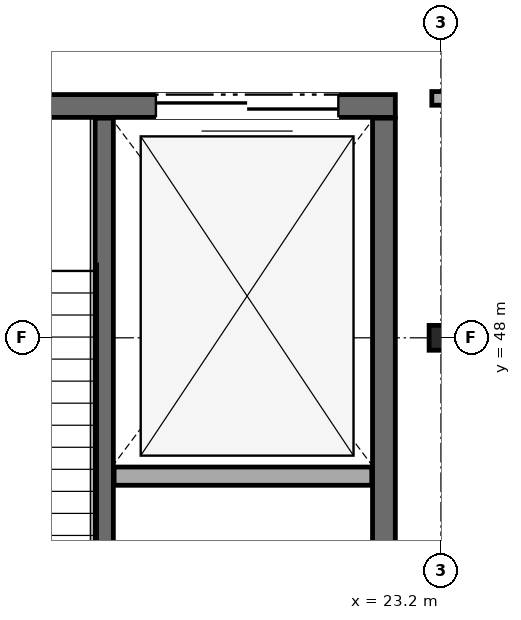
"""IFC4 building model, lengths in metres.
Left out: names, types, materials, properties, quantities, classifications, styles, units other than length and angle.
Written with IfcOpenShell. Run it as: python <this file> out.ifc"""

import sys

from ifc_helpers import new_model, si_unit, direction, frame, frame_2d, origin, origin_2d, place, context, subcontext, project, spatial, rectangle, i_section, extrude, element, fill, save


model = new_model("IFC4")
c1 = context("Model", 3, precision=1e-05, world=origin(), true_north=direction((0.0, 1.0)))
c2 = subcontext(c1, "Body", "Model", "MODEL_VIEW")
j1 = project(units=[si_unit("LENGTHUNIT", "METRE"), si_unit("PLANEANGLEUNIT", "RADIAN")], contexts=[c1])
p1 = place(None, origin())
s1 = spatial("IfcSite", under=j1, at=p1, CompositionType="ELEMENT")
p2 = place(p1, origin())
s2 = spatial("IfcBuilding", under=s1, at=p2, CompositionType="ELEMENT")
p3 = place(p2, frame((0.0, 0.0, 5.6)))
s3 = spatial("IfcBuildingStorey", under=s2, at=p3, CompositionType="ELEMENT", Elevation=5.6)
p4 = place(p3, frame((23.2, 48.0, 0.0), z_axis=(0.0, 0.0, 1.0), x_axis=(1.0, 0.0, 0.0)))
e1 = element("IfcColumn", 1, at=p4, inside=s3, PredefinedType="COLUMN", context=c2, shape_type="SweptSolid", body=[
    extrude(i_section(OverallWidth=0.311, OverallDepth=0.327, WebThickness=0.016, FlangeThickness=0.025, FilletRadius=0.017, at=origin_2d()), origin(), (0.0, 0.0, 1.0), 4.5),
])
p5 = place(p3, frame((22.6, 51.05, 0.0), z_axis=(0.0, 0.0, 1.0), x_axis=(-1.0, 0.0, 0.0)))
e2 = element("IfcWall", 2, at=p5, inside=s3, PredefinedType="SHEAR", context=c2, shape_type="SweptSolid", body=[
    extrude(rectangle(XDim=8.4, YDim=0.3, at=frame_2d((4.2, 0.0))), origin(), (0.0, 0.0, 1.0), 4.215),
])
p6 = place(p5, frame((5.435, 0.0, 0.0)))
e3 = element("IfcOpeningElement", 3, at=p6, cuts=e2, PredefinedType="OPENING", context=c2, shape_type="SweptSolid", body=[
    extrude(rectangle(XDim=1.25, YDim=2.2, at=frame_2d((0.625, 1.1))), frame((0.0, 0.16, 0.0), z_axis=(0.0, -1.0, 0.0), x_axis=(1.0, 0.0, 0.0)), (0.0, 0.0, 1.0), 0.32),
])
p7 = place(p5, frame((0.75, 0.0, 0.0)))
e4 = element("IfcOpeningElement", 4, at=p7, cuts=e2, PredefinedType="OPENING", context=c2, shape_type="SweptSolid", body=[
    extrude(rectangle(XDim=2.4, YDim=2.55, at=frame_2d((1.2, 1.275))), frame((0.0, 0.16, 0.0), z_axis=(0.0, -1.0, 0.0), x_axis=(1.0, 0.0, 0.0)), (0.0, 0.0, 1.0), 0.32),
])
p8 = place(p3, frame((22.45, 41.51, 0.0), z_axis=(0.0, 0.0, 1.0), x_axis=(0.0, 1.0, 0.0)))
e5 = element("IfcWall", 5, at=p8, inside=s3, PredefinedType="SHEAR", context=c2, shape_type="SweptSolid", body=[
    extrude(rectangle(XDim=9.38, YDim=0.3, at=frame_2d((4.69, 0.0))), origin(), (0.0, 0.0, 1.0), 4.215),
])
p9 = place(p3, frame((18.77, 41.51, 0.0), z_axis=(0.0, 0.0, 1.0), x_axis=(0.0, 1.0, 0.0)))
e6 = element("IfcWall", 6, at=p9, inside=s3, PredefinedType="SOLIDWALL", context=c2, shape_type="SweptSolid", body=[
    extrude(rectangle(XDim=9.38, YDim=0.24, at=frame_2d((4.69, 0.0))), origin(), (0.0, 0.0, 1.0), 4.215),
])
p10 = place(p3, frame((18.9, 46.18, 0.0), z_axis=(0.0, 0.0, 1.0), x_axis=(1.0, 0.0, 0.0)))
e7 = element("IfcWall", 7, at=p10, inside=s3, PredefinedType="SOLIDWALL", context=c2, shape_type="SweptSolid", body=[
    extrude(rectangle(XDim=3.39, YDim=0.24, at=frame_2d((1.695, 0.0))), origin(), (0.0, 0.0, 1.0), 4.215),
])
p11 = place(p3, frame((23.08, 51.15, 0.0), z_axis=(0.0, 0.0, 1.0), x_axis=(1.0, 0.0, 0.0)))
e8 = element("IfcWall", 8, at=p11, inside=s3, PredefinedType="PARTITIONING", context=c2, shape_type="SweptSolid", body=[
    extrude(rectangle(XDim=3.04, YDim=0.18, at=frame_2d((1.52, 0.0))), origin(), (0.0, 0.0, 1.0), 3.733),
])
p12 = place(p7, origin())
e9 = element("IfcDoor", 9, at=p12, inside=s3, OperationType="DOUBLE_DOOR_SLIDING", PredefinedType="DOOR", context=c2, shape_type="SweptSolid", body=[
    extrude(rectangle(XDim=2.4, YDim=2.55, at=frame_2d((1.2, 1.275))), frame((0.0, 0.025, 0.0), z_axis=(0.0, -1.0, 0.0), x_axis=(1.0, 0.0, 0.0)), (0.0, 0.0, 1.0), 0.05),
])
fill(e4, e9)
save(model, sys.argv[1])
